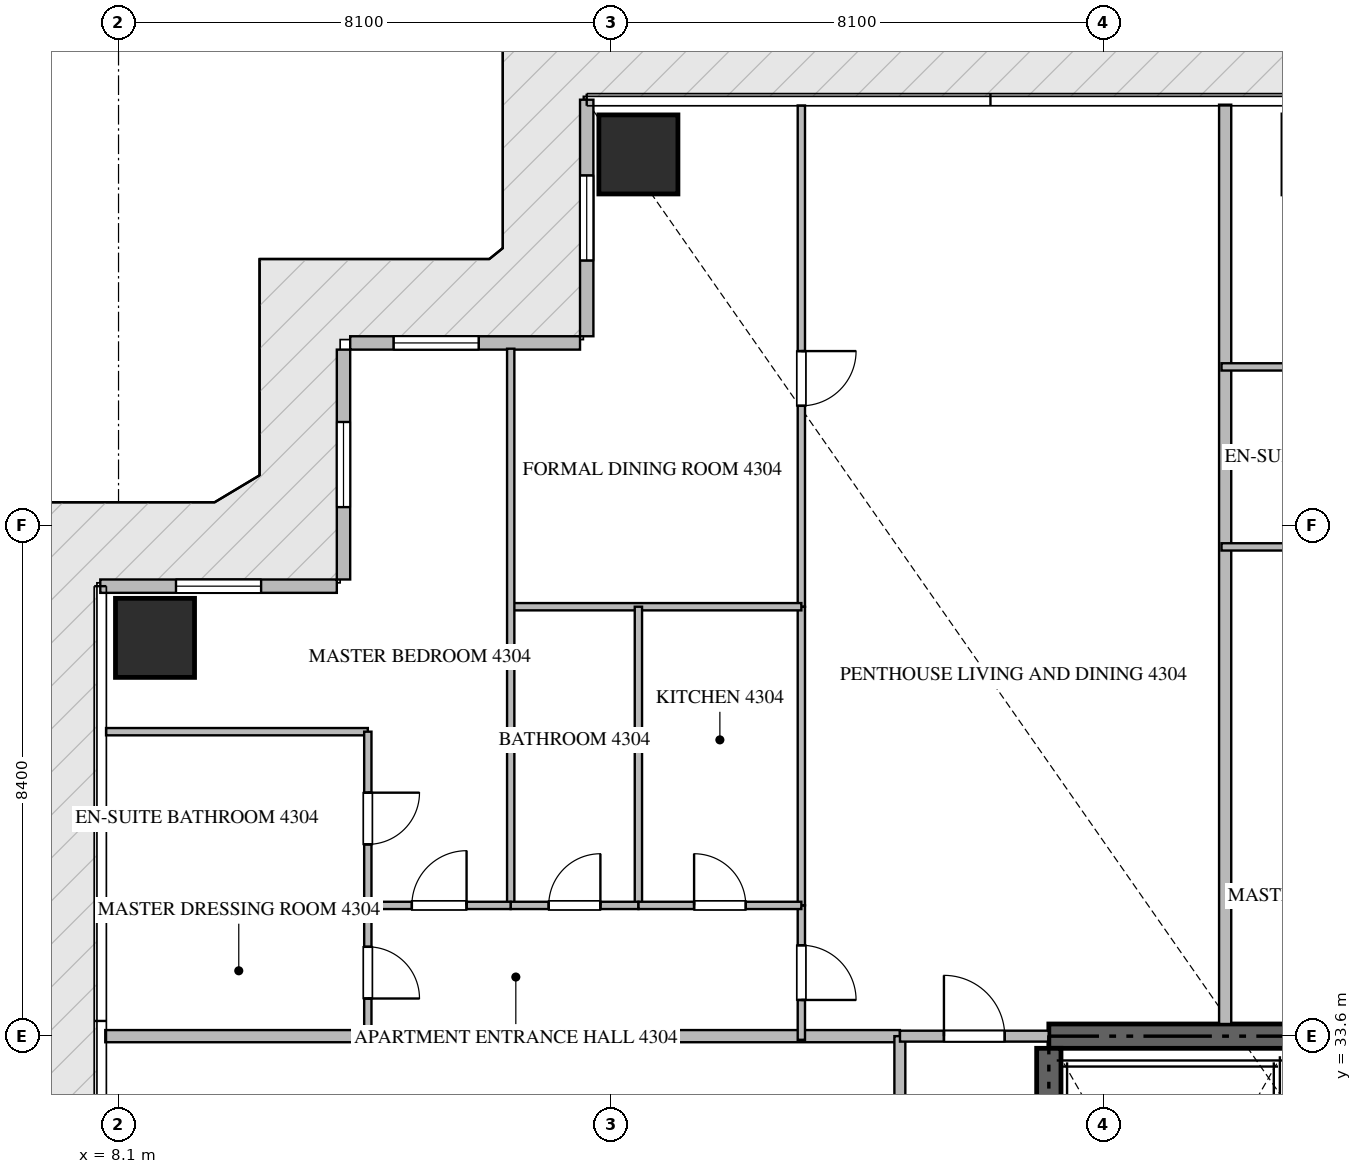
"""IFC4 building model, lengths in metres.
Left out: names, types, materials, properties, quantities, classifications, styles, units other than length and angle.
Written with IfcOpenShell. Run it as: python <this file> out.ifc"""

import sys

from ifc_helpers import new_model, si_unit, direction, frame, frame_2d, origin, origin_2d, place, context, subcontext, project, spatial, rectangle, extrude, source, transform, mapped, element, fill, save


model = new_model("IFC4")
c1 = context("Model", 3, precision=1e-05, world=origin(), true_north=direction((0.0, 1.0)))
c2 = subcontext(c1, "Body", "Model", "MODEL_VIEW")
j1 = project(units=[si_unit("LENGTHUNIT", "METRE"), si_unit("PLANEANGLEUNIT", "RADIAN")], contexts=[c1])
p1 = place(None, origin())
s1 = spatial("IfcSite", under=j1, at=p1, CompositionType="ELEMENT")
p2 = place(p1, origin())
s2 = spatial("IfcBuilding", under=s1, at=p2, CompositionType="ELEMENT")
p3 = place(p2, frame((0.0, 0.0, 172.65)))
s3 = spatial("IfcBuildingStorey", under=s2, at=p3, CompositionType="ELEMENT", Elevation=172.65)
p4 = place(p3, frame((41.4, 33.6, -0.26), z_axis=(0.0, 0.0, 1.0), x_axis=(-1.0, 0.0, 0.0)))
e1 = element("IfcWall", 1, at=p4, inside=s3, PredefinedType="SHEAR", context=c2, shape_type="SweptSolid", body=[
    extrude(rectangle(XDim=18.0, YDim=0.4, at=frame_2d((9.0, 0.0))), origin(), (0.0, 0.0, 1.0), 3.748),
])
p5 = place(p3, frame((23.4, 24.25, -0.26), z_axis=(0.0, 0.0, 1.0), x_axis=(0.0, 1.0, 0.0)))
e2 = element("IfcWall", 2, at=p5, inside=s3, PredefinedType="SHEAR", context=c2, shape_type="SweptSolid", body=[
    extrude(rectangle(XDim=9.15, YDim=0.4, at=frame_2d((4.575, 0.0))), origin(), (0.0, 0.0, 1.0), 3.748),
])
m1 = source(origin(), c2, "Body", "SweptSolid", [
    extrude(rectangle(XDim=1.3, YDim=1.3, at=origin_2d()), origin(), (0.0, 0.0, 1.0), 3.75),
])
for number, where, z_axis, x_axis in (
    (3, (16.65, 48.1, -0.26), (0.0, 0.0, 1.0), (1.0, 0.0, 0.0)),
    (4, (8.7, 40.15, -0.26), (0.0, 0.0, 1.0), (1.0, 0.0, 0.0)),
):
    element("IfcColumn", number, at=place(p3, frame(where, z_axis=z_axis, x_axis=x_axis)), inside=s3, PredefinedType="COLUMN", context=c2, shape_type="MappedRepresentation", body=[
        mapped(m1, transform((0.0, 0.0, 0.0), scale=1.0)),
    ])
p6 = place(p3, frame((15.8, 49.0, 0.0), z_axis=(0.0, 0.0, 1.0), x_axis=(0.0, -1.0, 0.0)))
e5 = element("IfcWall", 5, at=p6, inside=s3, PredefinedType="ELEMENTEDWALL", context=c2, shape_type="SweptSolid", body=[
    extrude(rectangle(XDim=3.89, YDim=0.22, at=frame_2d((1.945, 0.0))), origin(), (0.0, 0.0, 1.0), 3.475),
])
p7 = place(p6, frame((1.245, 0.0, 0.65)))
e6 = element("IfcOpeningElement", 6, at=p7, cuts=e5, PredefinedType="OPENING", context=c2, shape_type="SweptSolid", body=[
    extrude(rectangle(XDim=1.4, YDim=2.05, at=frame_2d((0.7, 1.025))), frame((0.0, 0.12, 0.0), z_axis=(0.0, -1.0, 0.0), x_axis=(1.0, 0.0, 0.0)), (0.0, 0.0, 1.0), 0.24),
])
p8 = place(p3, frame((15.69, 45.0, 0.0), z_axis=(0.0, 0.0, 1.0), x_axis=(-1.0, 0.0, 0.0)))
e7 = element("IfcWall", 7, at=p8, inside=s3, PredefinedType="ELEMENTEDWALL", context=c2, shape_type="SweptSolid", body=[
    extrude(rectangle(XDim=3.78, YDim=0.22, at=frame_2d((1.89, 0.0))), origin(), (0.0, 0.0, 1.0), 3.475),
])
p9 = place(p8, frame((1.666, 0.0, 0.65)))
e8 = element("IfcOpeningElement", 8, at=p9, cuts=e7, PredefinedType="OPENING", context=c2, shape_type="SweptSolid", body=[
    extrude(rectangle(XDim=1.4, YDim=2.05, at=frame_2d((0.7, 1.025))), frame((0.0, 0.12, 0.0), z_axis=(0.0, -1.0, 0.0), x_axis=(1.0, 0.0, 0.0)), (0.0, 0.0, 1.0), 0.24),
])
p10 = place(p3, frame((11.8, 44.89, 0.0), z_axis=(0.0, 0.0, 1.0), x_axis=(0.0, -1.0, 0.0)))
e9 = element("IfcWall", 9, at=p10, inside=s3, PredefinedType="ELEMENTEDWALL", context=c2, shape_type="SweptSolid", body=[
    extrude(rectangle(XDim=3.78, YDim=0.22, at=frame_2d((1.89, 0.0))), origin(), (0.0, 0.0, 1.0), 3.475),
])
p11 = place(p10, frame((1.19, 0.0, 0.65)))
e10 = element("IfcOpeningElement", 10, at=p11, cuts=e9, PredefinedType="OPENING", context=c2, shape_type="SweptSolid", body=[
    extrude(rectangle(XDim=1.4, YDim=2.05, at=frame_2d((0.7, 1.025))), frame((0.0, 0.12, 0.0), z_axis=(0.0, -1.0, 0.0), x_axis=(1.0, 0.0, 0.0)), (0.0, 0.0, 1.0), 0.24),
])
p12 = place(p3, frame((11.69, 41.0, 0.0), z_axis=(0.0, 0.0, 1.0), x_axis=(-1.0, 0.0, 0.0)))
e11 = element("IfcWall", 11, at=p12, inside=s3, PredefinedType="ELEMENTEDWALL", context=c2, shape_type="SweptSolid", body=[
    extrude(rectangle(XDim=3.89, YDim=0.22, at=frame_2d((1.945, 0.0))), origin(), (0.0, 0.0, 1.0), 3.475),
])
p13 = place(p12, frame((1.245, 0.0, 0.65)))
e12 = element("IfcOpeningElement", 12, at=p13, cuts=e11, PredefinedType="OPENING", context=c2, shape_type="SweptSolid", body=[
    extrude(rectangle(XDim=1.4, YDim=2.05, at=frame_2d((0.7, 1.025))), frame((0.0, 0.12, 0.0), z_axis=(0.0, -1.0, 0.0), x_axis=(1.0, 0.0, 0.0)), (0.0, 0.0, 1.0), 0.24),
])
p14 = place(p3, frame((26.3, 33.8, 0.0), z_axis=(0.0, 0.0, 1.0), x_axis=(0.0, 1.0, 0.0)))
e13 = element("IfcWall", 13, at=p14, inside=s3, PredefinedType="PARTITIONING", context=c2, shape_type="SweptSolid", body=[
    extrude(rectangle(XDim=15.118, YDim=0.2, at=frame_2d((7.559, 0.0))), origin(), (0.0, 0.0, 1.0), 3.49),
])
p15 = place(p3, frame((7.882, 33.6, 0.0), z_axis=(0.0, 0.0, 1.0), x_axis=(1.0, 0.0, 0.0)))
e14 = element("IfcWall", 14, at=p15, inside=s3, PredefinedType="PARTITIONING", context=c2, shape_type="SweptSolid", body=[
    extrude(rectangle(XDim=13.068, YDim=0.2, at=frame_2d((6.534, 0.0))), origin(), (0.0, 0.0, 1.0), 3.49),
])
p16 = place(p3, frame((20.95, 14.9, 0.0), z_axis=(0.0, 0.0, 1.0), x_axis=(0.0, 1.0, 0.0)))
e15 = element("IfcWall", 15, at=p16, inside=s3, PredefinedType="PARTITIONING", context=c2, shape_type="SweptSolid", body=[
    extrude(rectangle(XDim=18.7, YDim=0.18, at=frame_2d((9.35, 0.0))), origin(), (0.0, 0.0, 1.0), 3.49),
])
p17 = place(p16, frame((5.328, 0.0, 0.0)))
e16 = element("IfcOpeningElement", 16, at=p17, cuts=e15, PredefinedType="OPENING", context=c2, shape_type="SweptSolid", body=[
    extrude(rectangle(XDim=1.0, YDim=2.15, at=frame_2d((0.5, 1.075))), frame((0.0, 0.1, 0.0), z_axis=(0.0, -1.0, 0.0), x_axis=(1.0, 0.0, 0.0)), (0.0, 0.0, 1.0), 0.2),
])
p18 = place(p16, frame((14.62, 0.0, 0.0)))
e17 = element("IfcOpeningElement", 17, at=p18, cuts=e15, PredefinedType="OPENING", context=c2, shape_type="SweptSolid", body=[
    extrude(rectangle(XDim=1.0, YDim=2.15, at=frame_2d((0.5, 1.075))), frame((0.0, 0.1, 0.0), z_axis=(0.0, -1.0, 0.0), x_axis=(1.0, 0.0, 0.0)), (0.0, 0.0, 1.0), 0.2),
])
p19 = place(p3, frame((20.952, 33.6, 0.0), z_axis=(0.0, 0.0, 1.0), x_axis=(1.0, 0.0, 0.0)))
e18 = element("IfcWall", 18, at=p19, inside=s3, PredefinedType="PARTITIONING", context=c2, shape_type="SweptSolid", body=[
    extrude(rectangle(XDim=2.446, YDim=0.18, at=frame_2d((1.223, 0.0))), origin(), (0.0, 0.0, 1.0), 3.49),
])
p20 = place(p19, frame((0.723, 0.0, 0.0)))
e19 = element("IfcOpeningElement", 19, at=p20, cuts=e18, PredefinedType="OPENING", context=c2, shape_type="SweptSolid", body=[
    extrude(rectangle(XDim=1.0, YDim=2.15, at=frame_2d((0.5, 1.075))), frame((0.0, 0.1, 0.0), z_axis=(0.0, -1.0, 0.0), x_axis=(1.0, 0.0, 0.0)), (0.0, 0.0, 1.0), 0.2),
])
p21 = place(p3, frame((19.33, 35.75, 0.0), z_axis=(0.0, 0.0, 1.0), x_axis=(0.0, -1.0, 0.0)))
e20 = element("IfcWall", 20, at=p21, inside=s3, PredefinedType="PARTITIONING", context=c2, shape_type="SweptSolid", body=[
    extrude(rectangle(XDim=2.21, YDim=0.12, at=frame_2d((1.105, 0.0))), origin(), (0.0, 0.0, 1.0), 3.49),
])
p22 = place(p21, frame((0.655, 0.0, 0.0)))
e21 = element("IfcOpeningElement", 21, at=p22, cuts=e20, PredefinedType="OPENING", context=c2, shape_type="SweptSolid", body=[
    extrude(rectangle(XDim=0.9, YDim=2.1, at=frame_2d((0.45, 1.05))), frame((0.0, 0.07, 0.0), z_axis=(0.0, -1.0, 0.0), x_axis=(1.0, 0.0, 0.0)), (0.0, 0.0, 1.0), 0.14),
])
p23 = place(p3, frame((19.33, 48.905, 0.0), z_axis=(0.0, 0.0, 1.0), x_axis=(0.0, -1.0, 0.0)))
e22 = element("IfcWall", 22, at=p23, inside=s3, PredefinedType="PARTITIONING", context=c2, shape_type="SweptSolid", body=[
    extrude(rectangle(XDim=8.243, YDim=0.12, at=frame_2d((4.122, 0.0))), origin(), (0.0, 0.0, 1.0), 3.49),
])
p24 = place(p23, frame((4.039, 0.0, 0.0)))
e23 = element("IfcOpeningElement", 23, at=p24, cuts=e22, PredefinedType="OPENING", context=c2, shape_type="SweptSolid", body=[
    extrude(rectangle(XDim=0.9, YDim=2.1, at=frame_2d((0.45, 1.05))), frame((0.0, 0.07, 0.0), z_axis=(0.0, -1.0, 0.0), x_axis=(1.0, 0.0, 0.0)), (0.0, 0.0, 1.0), 0.14),
])
p25 = place(p3, frame((19.33, 40.66, 0.0), z_axis=(0.0, 0.0, 1.0), x_axis=(0.0, -1.0, 0.0)))
e24 = element("IfcWall", 24, at=p25, inside=s3, PredefinedType="PARTITIONING", context=c2, shape_type="SweptSolid", body=[
    extrude(rectangle(XDim=4.908, YDim=0.12, at=frame_2d((2.454, 0.0))), origin(), (0.0, 0.0, 1.0), 3.49),
])
p26 = place(p3, frame((14.55, 40.662, 0.0), z_axis=(0.0, 0.0, 1.0), x_axis=(1.0, 0.0, 0.0)))
e25 = element("IfcWall", 25, at=p26, inside=s3, PredefinedType="PARTITIONING", context=c2, shape_type="SweptSolid", body=[
    extrude(rectangle(XDim=4.78, YDim=0.12, at=frame_2d((2.39, 0.0))), origin(), (0.0, 0.0, 1.0), 3.49),
])
p27 = place(p3, frame((14.55, 44.905, 0.0), z_axis=(0.0, 0.0, 1.0), x_axis=(0.0, -1.0, 0.0)))
e26 = element("IfcWall", 26, at=p27, inside=s3, PredefinedType="PARTITIONING", context=c2, shape_type="SweptSolid", body=[
    extrude(rectangle(XDim=9.155, YDim=0.12, at=frame_2d((4.578, 0.0))), origin(), (0.0, 0.0, 1.0), 3.49),
])
p28 = place(p3, frame((16.65, 40.662, 0.0), z_axis=(0.0, 0.0, 1.0), x_axis=(0.0, -1.0, 0.0)))
e27 = element("IfcWall", 27, at=p28, inside=s3, PredefinedType="PARTITIONING", context=c2, shape_type="SweptSolid", body=[
    extrude(rectangle(XDim=4.912, YDim=0.12, at=frame_2d((2.456, 0.0))), origin(), (0.0, 0.0, 1.0), 2.972),
])
p29 = place(p3, frame((14.55, 35.75, 0.0), z_axis=(0.0, 0.0, 1.0), x_axis=(1.0, 0.0, 0.0)))
e28 = element("IfcWall", 28, at=p29, inside=s3, PredefinedType="PARTITIONING", context=c2, shape_type="SweptSolid", body=[
    extrude(rectangle(XDim=2.1, YDim=0.12, at=frame_2d((1.05, 0.0))), origin(), (0.0, 0.0, 1.0), 3.49),
])
p30 = place(p29, frame((0.625, 0.0, 0.0)))
e29 = element("IfcOpeningElement", 29, at=p30, cuts=e28, PredefinedType="OPENING", context=c2, shape_type="SweptSolid", body=[
    extrude(rectangle(XDim=0.85, YDim=2.1, at=frame_2d((0.425, 1.05))), frame((0.0, 0.07, 0.0), z_axis=(0.0, -1.0, 0.0), x_axis=(1.0, 0.0, 0.0)), (0.0, 0.0, 1.0), 0.14),
])
p31 = place(p3, frame((16.652, 35.75, 0.0), z_axis=(0.0, 0.0, 1.0), x_axis=(1.0, 0.0, 0.0)))
e30 = element("IfcWall", 30, at=p31, inside=s3, PredefinedType="PARTITIONING", context=c2, shape_type="SweptSolid", body=[
    extrude(rectangle(XDim=2.678, YDim=0.12, at=frame_2d((1.339, 0.0))), origin(), (0.0, 0.0, 1.0), 3.49),
])
p32 = place(p31, frame((0.914, 0.0, 0.0)))
e31 = element("IfcOpeningElement", 31, at=p32, cuts=e30, PredefinedType="OPENING", context=c2, shape_type="SweptSolid", body=[
    extrude(rectangle(XDim=0.85, YDim=2.1, at=frame_2d((0.425, 1.05))), frame((0.0, 0.07, 0.0), z_axis=(0.0, -1.0, 0.0), x_axis=(1.0, 0.0, 0.0)), (0.0, 0.0, 1.0), 0.14),
])
p33 = place(p3, frame((12.2, 35.75, 0.0), z_axis=(0.0, 0.0, 1.0), x_axis=(1.0, 0.0, 0.0)))
e32 = element("IfcWall", 32, at=p33, inside=s3, PredefinedType="PARTITIONING", context=c2, shape_type="SweptSolid", body=[
    extrude(rectangle(XDim=2.348, YDim=0.12, at=frame_2d((1.174, 0.0))), origin(), (0.0, 0.0, 1.0), 3.49),
])
p34 = place(p33, frame((0.724, 0.0, 0.0)))
e33 = element("IfcOpeningElement", 33, at=p34, cuts=e32, PredefinedType="OPENING", context=c2, shape_type="SweptSolid", body=[
    extrude(rectangle(XDim=0.9, YDim=2.1, at=frame_2d((0.45, 1.05))), frame((0.0, 0.07, 0.0), z_axis=(0.0, -1.0, 0.0), x_axis=(1.0, 0.0, 0.0)), (0.0, 0.0, 1.0), 0.14),
])
p35 = place(p3, frame((7.895, 38.607, 0.0), z_axis=(0.0, 0.0, 1.0), x_axis=(1.0, 0.0, 0.0)))
e34 = element("IfcWall", 34, at=p35, inside=s3, PredefinedType="PARTITIONING", context=c2, shape_type="SweptSolid", body=[
    extrude(rectangle(XDim=4.305, YDim=0.12, at=frame_2d((2.152, 0.0))), origin(), (0.0, 0.0, 1.0), 3.49),
])
p36 = place(p3, frame((7.895, 35.75, 0.0), z_axis=(0.0, 0.0, 1.0), x_axis=(1.0, 0.0, 0.0)))
e35 = element("IfcWall", 35, at=p36, inside=s3, PredefinedType="PARTITIONING", context=c2, shape_type="SweptSolid", body=[
    extrude(rectangle(XDim=4.303, YDim=0.12, at=frame_2d((2.151, 0.0))), origin(), (0.0, 0.0, 1.0), 3.49),
])
p37 = place(p3, frame((12.2, 38.607, 0.0), z_axis=(0.0, 0.0, 1.0), x_axis=(0.0, -1.0, 0.0)))
e36 = element("IfcWall", 36, at=p37, inside=s3, PredefinedType="PARTITIONING", context=c2, shape_type="SweptSolid", body=[
    extrude(rectangle(XDim=2.857, YDim=0.12, at=frame_2d((1.428, 0.0))), origin(), (0.0, 0.0, 1.0), 3.49),
])
p38 = place(p37, frame((1.003, 0.0, 0.0)))
e37 = element("IfcOpeningElement", 37, at=p38, cuts=e36, PredefinedType="OPENING", context=c2, shape_type="SweptSolid", body=[
    extrude(rectangle(XDim=0.85, YDim=2.1, at=frame_2d((0.425, 1.05))), frame((0.0, 0.07, 0.0), z_axis=(0.0, -1.0, 0.0), x_axis=(1.0, 0.0, 0.0)), (0.0, 0.0, 1.0), 0.14),
])
p39 = place(p3, frame((12.2, 35.748, 0.0), z_axis=(0.0, 0.0, 1.0), x_axis=(0.0, -1.0, 0.0)))
e38 = element("IfcWall", 38, at=p39, inside=s3, PredefinedType="PARTITIONING", context=c2, shape_type="SweptSolid", body=[
    extrude(rectangle(XDim=2.208, YDim=0.12, at=frame_2d((1.104, 0.0))), origin(), (0.0, 0.0, 1.0), 3.49),
])
p40 = place(p39, frame((0.679, 0.0, 0.0)))
e39 = element("IfcOpeningElement", 39, at=p40, cuts=e38, PredefinedType="OPENING", context=c2, shape_type="SweptSolid", body=[
    extrude(rectangle(XDim=0.85, YDim=2.1, at=frame_2d((0.425, 1.05))), frame((0.0, 0.07, 0.0), z_axis=(0.0, -1.0, 0.0), x_axis=(1.0, 0.0, 0.0)), (0.0, 0.0, 1.0), 0.14),
])
for number, where, z_axis, x_axis in (
    (40, (26.24, 44.606, 0.0), (0.0, 0.0, 1.0), (1.0, 0.0, 0.0)),
    (41, (26.24, 41.646, 0.0), (0.0, 0.0, 1.0), (1.0, 0.0, 0.0)),
):
    element("IfcWall", number, at=place(p3, frame(where, z_axis=z_axis, x_axis=x_axis)), inside=s3, PredefinedType="PARTITIONING", context=c2, shape_type="SweptSolid", body=[
        extrude(rectangle(XDim=4.79, YDim=0.12, at=frame_2d((2.395, 0.0))), origin(), (0.0, 0.0, 1.0), 3.49),
    ])
m2 = source(origin(), c2, "Body", "SweptSolid", [
    extrude(rectangle(XDim=1.4, YDim=2.05, at=frame_2d((0.7, 1.025))), frame((0.0, 0.03, 0.0), z_axis=(0.0, -1.0, 0.0), x_axis=(1.0, 0.0, 0.0)), (0.0, 0.0, 1.0), 0.06),
])
p41 = place(p7, origin())
e42 = element("IfcWindow", 42, at=p41, inside=s3, PartitioningType="SINGLE_PANEL", PredefinedType="WINDOW", context=c2, shape_type="MappedRepresentation", body=[
    mapped(m2, transform((0.0, 0.0, 0.0), scale=1.0)),
])
fill(e6, e42)
p42 = place(p9, origin())
e43 = element("IfcWindow", 43, at=p42, inside=s3, PartitioningType="SINGLE_PANEL", PredefinedType="WINDOW", context=c2, shape_type="MappedRepresentation", body=[
    mapped(m2, transform((0.0, 0.0, 0.0), scale=1.0)),
])
fill(e8, e43)
p43 = place(p11, origin())
e44 = element("IfcWindow", 44, at=p43, inside=s3, PartitioningType="SINGLE_PANEL", PredefinedType="WINDOW", context=c2, shape_type="MappedRepresentation", body=[
    mapped(m2, transform((0.0, 0.0, 0.0), scale=1.0)),
])
fill(e10, e44)
p44 = place(p13, origin())
e45 = element("IfcWindow", 45, at=p44, inside=s3, PartitioningType="SINGLE_PANEL", PredefinedType="WINDOW", context=c2, shape_type="MappedRepresentation", body=[
    mapped(m2, transform((0.0, 0.0, 0.0), scale=1.0)),
])
fill(e12, e45)
m3 = source(origin(), c2, "Body", "SweptSolid", [
    extrude(rectangle(XDim=1.0, YDim=2.15, at=frame_2d((0.5, 1.075))), frame((0.0, 0.025, 0.0), z_axis=(0.0, -1.0, 0.0), x_axis=(1.0, 0.0, 0.0)), (0.0, 0.0, 1.0), 0.05),
])
p45 = place(p20, origin())
e46 = element("IfcDoor", 46, at=p45, inside=s3, OperationType="SINGLE_SWING_LEFT", PredefinedType="DOOR", context=c2, shape_type="MappedRepresentation", body=[
    mapped(m3, transform((0.0, 0.0, 0.0), scale=1.0)),
])
fill(e19, e46)
m4 = source(origin(), c2, "Body", "SweptSolid", [
    extrude(rectangle(XDim=0.9, YDim=2.1, at=frame_2d((0.45, 1.05))), frame((0.0, 0.025, 0.0), z_axis=(0.0, -1.0, 0.0), x_axis=(1.0, 0.0, 0.0)), (0.0, 0.0, 1.0), 0.05),
])
p46 = place(p22, origin())
e47 = element("IfcDoor", 47, at=p46, inside=s3, OperationType="SINGLE_SWING_RIGHT", PredefinedType="DOOR", context=c2, shape_type="MappedRepresentation", body=[
    mapped(m4, transform((0.0, 0.0, 0.0), scale=1.0)),
])
fill(e21, e47)
p47 = place(p24, origin())
e48 = element("IfcDoor", 48, at=p47, inside=s3, OperationType="SINGLE_SWING_LEFT", PredefinedType="DOOR", context=c2, shape_type="MappedRepresentation", body=[
    mapped(m4, transform((0.0, 0.0, 0.0), scale=1.0)),
])
fill(e23, e48)
m5 = source(origin(), c2, "Body", "SweptSolid", [
    extrude(rectangle(XDim=0.85, YDim=2.1, at=frame_2d((0.425, 1.05))), frame((0.0, 0.025, 0.0), z_axis=(0.0, -1.0, 0.0), x_axis=(1.0, 0.0, 0.0)), (0.0, 0.0, 1.0), 0.05),
])
p48 = place(p30, origin())
e49 = element("IfcDoor", 49, at=p48, inside=s3, OperationType="SINGLE_SWING_RIGHT", PredefinedType="DOOR", context=c2, shape_type="MappedRepresentation", body=[
    mapped(m5, transform((0.0, 0.0, 0.0), scale=1.0)),
])
fill(e29, e49)
p49 = place(p32, origin())
e50 = element("IfcDoor", 50, at=p49, inside=s3, OperationType="SINGLE_SWING_LEFT", PredefinedType="DOOR", context=c2, shape_type="MappedRepresentation", body=[
    mapped(m5, transform((0.0, 0.0, 0.0), scale=1.0)),
])
fill(e31, e50)
p50 = place(p34, origin())
e51 = element("IfcDoor", 51, at=p50, inside=s3, OperationType="SINGLE_SWING_RIGHT", PredefinedType="DOOR", context=c2, shape_type="MappedRepresentation", body=[
    mapped(m4, transform((0.0, 0.0, 0.0), scale=1.0)),
])
fill(e33, e51)
p51 = place(p38, origin())
e52 = element("IfcDoor", 52, at=p51, inside=s3, OperationType="SINGLE_SWING_LEFT", PredefinedType="DOOR", context=c2, shape_type="MappedRepresentation", body=[
    mapped(m5, transform((0.0, 0.0, 0.0), scale=1.0)),
])
fill(e37, e52)
p52 = place(p40, origin())
e53 = element("IfcDoor", 53, at=p52, inside=s3, OperationType="SINGLE_SWING_RIGHT", PredefinedType="DOOR", context=c2, shape_type="MappedRepresentation", body=[
    mapped(m5, transform((0.0, 0.0, 0.0), scale=1.0)),
])
fill(e39, e53)
save(model, sys.argv[1])
